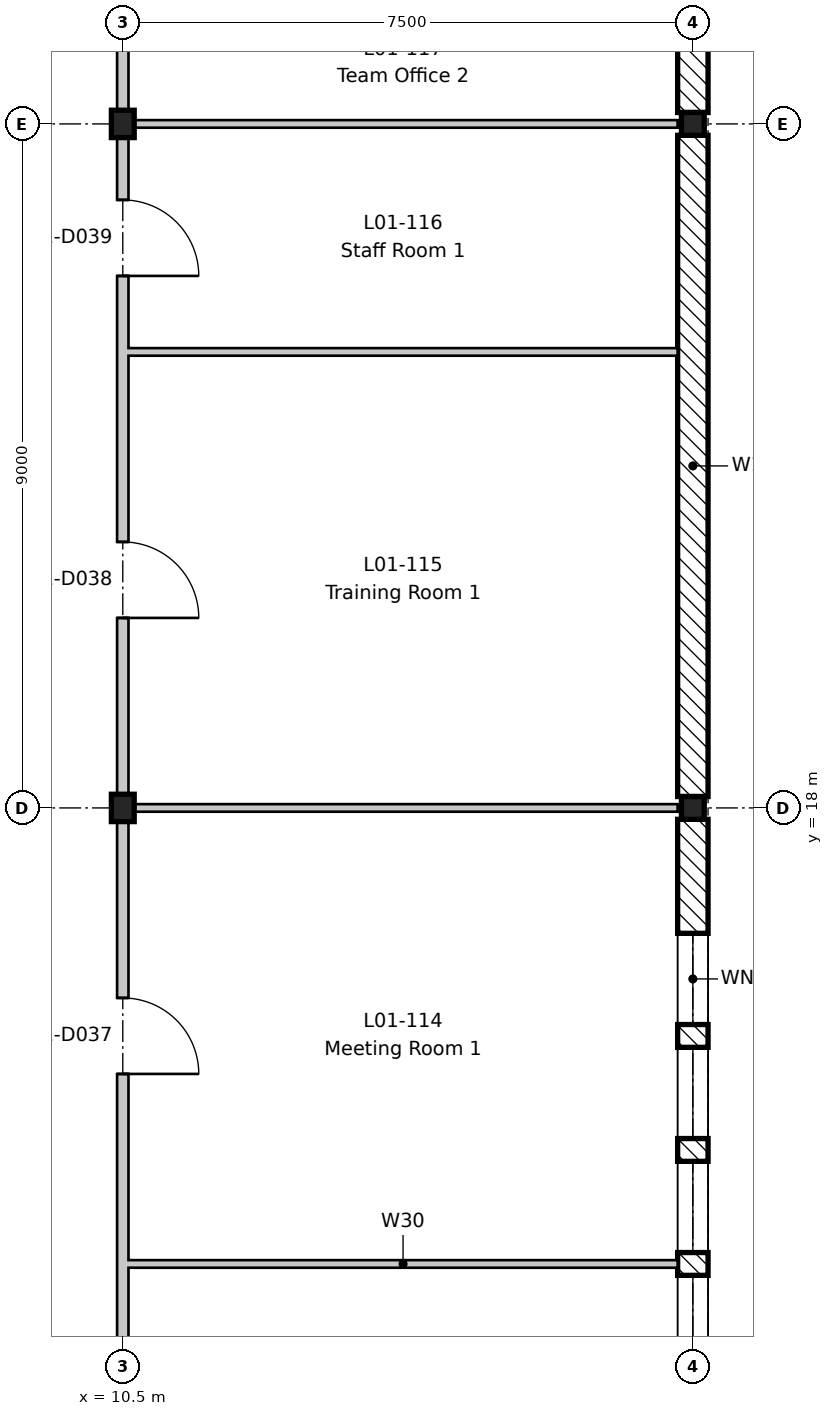
"""IFC4 building model, lengths in metres.
Left out: names, types, materials, properties, quantities, classifications, styles, units other than length and angle.
Written with IfcOpenShell. Run it as: python <this file> out.ifc"""

import sys

from ifc_helpers import new_model, si_unit, direction, frame, frame_2d, origin, origin_2d, place, context, subcontext, project, spatial, rectangle, i_section, extrude, element, fill, save


model = new_model("IFC4")
c1 = context("Model", 3, precision=1e-05, world=origin(), true_north=direction((0.0, 1.0)))
c2 = subcontext(c1, "Body", "Model", "MODEL_VIEW")
j1 = project(units=[si_unit("LENGTHUNIT", "METRE"), si_unit("PLANEANGLEUNIT", "RADIAN")], contexts=[c1])
p1 = place(None, origin())
s1 = spatial("IfcSite", under=j1, at=p1, CompositionType="ELEMENT")
p2 = place(p1, origin())
s2 = spatial("IfcBuilding", under=s1, at=p2, CompositionType="ELEMENT")
p3 = place(p2, frame((0.0, 0.0, 5.4)))
s3 = spatial("IfcBuildingStorey", under=s2, at=p3, CompositionType="ELEMENT", Elevation=5.4)
for number, where, z_axis, x_axis in (
    (1, (10.5, 18.0, -0.2), (0.0, 0.0, 1.0), (1.0, 0.0, 0.0)),
    (2, (10.5, 27.0, -0.2), (0.0, 0.0, 1.0), (1.0, 0.0, 0.0)),
):
    element("IfcColumn", number, at=place(p3, frame(where, z_axis=z_axis, x_axis=x_axis)), inside=s3, PredefinedType="COLUMN", context=c2, shape_type="SweptSolid", body=[
        extrude(i_section(OverallWidth=0.3, OverallDepth=0.36, WebThickness=0.012, FlangeThickness=0.022, FilletRadius=0.027, at=origin_2d()), origin(), (0.0, 0.0, 1.0), 4.5),
    ])
for number, where, z_axis, x_axis in (
    (3, (18.0, 18.0, -0.2), (0.0, 0.0, 1.0), (1.0, 0.0, 0.0)),
    (4, (18.0, 27.0, -0.2), (0.0, 0.0, 1.0), (1.0, 0.0, 0.0)),
):
    element("IfcColumn", number, at=place(p3, frame(where, z_axis=z_axis, x_axis=x_axis)), inside=s3, PredefinedType="COLUMN", context=c2, shape_type="SweptSolid", body=[
        extrude(i_section(OverallWidth=0.3, OverallDepth=0.3, WebThickness=0.011, FlangeThickness=0.019, FilletRadius=0.027, at=origin_2d()), origin(), (0.0, 0.0, 1.0), 4.5),
    ])
p4 = place(p3, frame((18.0, 17.85, 0.0), z_axis=(0.0, 0.0, 1.0), x_axis=(0.0, -1.0, 0.0)))
e5 = element("IfcWall", 5, at=p4, inside=s3, PredefinedType="STANDARD", context=c2, shape_type="SweptSolid", body=[
    extrude(rectangle(XDim=8.7, YDim=0.4, at=frame_2d((4.35, 0.0))), origin(), (0.0, 0.0, 1.0), 3.9),
])
p5 = place(p4, frame((6.0, 0.0, 0.6)))
e6 = element("IfcOpeningElement", 6, at=p5, cuts=e5, PredefinedType="OPENING", context=c2, shape_type="SweptSolid", body=[
    extrude(rectangle(XDim=1.2, YDim=3.0, at=frame_2d((0.6, 1.5))), frame((0.0, 0.21, 0.0), z_axis=(0.0, -1.0, 0.0), x_axis=(1.0, 0.0, 0.0)), (0.0, 0.0, 1.0), 0.42),
])
p6 = place(p4, frame((4.5, 0.0, 0.6)))
e7 = element("IfcOpeningElement", 7, at=p6, cuts=e5, PredefinedType="OPENING", context=c2, shape_type="SweptSolid", body=[
    extrude(rectangle(XDim=1.2, YDim=3.0, at=frame_2d((0.6, 1.5))), frame((0.0, 0.21, 0.0), z_axis=(0.0, -1.0, 0.0), x_axis=(1.0, 0.0, 0.0)), (0.0, 0.0, 1.0), 0.42),
])
p7 = place(p4, frame((3.0, 0.0, 0.6)))
e8 = element("IfcOpeningElement", 8, at=p7, cuts=e5, PredefinedType="OPENING", context=c2, shape_type="SweptSolid", body=[
    extrude(rectangle(XDim=1.2, YDim=3.0, at=frame_2d((0.6, 1.5))), frame((0.0, 0.21, 0.0), z_axis=(0.0, -1.0, 0.0), x_axis=(1.0, 0.0, 0.0)), (0.0, 0.0, 1.0), 0.42),
])
p8 = place(p4, frame((1.5, 0.0, 0.6)))
e9 = element("IfcOpeningElement", 9, at=p8, cuts=e5, PredefinedType="OPENING", context=c2, shape_type="SweptSolid", body=[
    extrude(rectangle(XDim=1.2, YDim=3.0, at=frame_2d((0.6, 1.5))), frame((0.0, 0.21, 0.0), z_axis=(0.0, -1.0, 0.0), x_axis=(1.0, 0.0, 0.0)), (0.0, 0.0, 1.0), 0.42),
])
p9 = place(p3, frame((18.0, 26.85, 0.0), z_axis=(0.0, 0.0, 1.0), x_axis=(0.0, -1.0, 0.0)))
e10 = element("IfcWall", 10, at=p9, inside=s3, PredefinedType="STANDARD", context=c2, shape_type="SweptSolid", body=[
    extrude(rectangle(XDim=8.7, YDim=0.4, at=frame_2d((4.35, 0.0))), origin(), (0.0, 0.0, 1.0), 3.9),
])
p10 = place(p3, frame((18.0, 35.85, 0.0), z_axis=(0.0, 0.0, 1.0), x_axis=(0.0, -1.0, 0.0)))
e11 = element("IfcWall", 11, at=p10, inside=s3, PredefinedType="STANDARD", context=c2, shape_type="SweptSolid", body=[
    extrude(rectangle(XDim=8.7, YDim=0.4, at=frame_2d((4.35, 0.0))), origin(), (0.0, 0.0, 1.0), 3.9),
])
p11 = place(p10, frame((6.0, 0.0, 0.6)))
e12 = element("IfcOpeningElement", 12, at=p11, cuts=e11, PredefinedType="OPENING", context=c2, shape_type="SweptSolid", body=[
    extrude(rectangle(XDim=1.2, YDim=3.0, at=frame_2d((0.6, 1.5))), frame((0.0, 0.21, 0.0), z_axis=(0.0, -1.0, 0.0), x_axis=(1.0, 0.0, 0.0)), (0.0, 0.0, 1.0), 0.42),
])
p12 = place(p10, frame((4.5, 0.0, 0.6)))
e13 = element("IfcOpeningElement", 13, at=p12, cuts=e11, PredefinedType="OPENING", context=c2, shape_type="SweptSolid", body=[
    extrude(rectangle(XDim=1.2, YDim=3.0, at=frame_2d((0.6, 1.5))), frame((0.0, 0.21, 0.0), z_axis=(0.0, -1.0, 0.0), x_axis=(1.0, 0.0, 0.0)), (0.0, 0.0, 1.0), 0.42),
])
p13 = place(p10, frame((3.0, 0.0, 0.6)))
e14 = element("IfcOpeningElement", 14, at=p13, cuts=e11, PredefinedType="OPENING", context=c2, shape_type="SweptSolid", body=[
    extrude(rectangle(XDim=1.2, YDim=3.0, at=frame_2d((0.6, 1.5))), frame((0.0, 0.21, 0.0), z_axis=(0.0, -1.0, 0.0), x_axis=(1.0, 0.0, 0.0)), (0.0, 0.0, 1.0), 0.42),
])
p14 = place(p10, frame((1.5, 0.0, 0.6)))
e15 = element("IfcOpeningElement", 15, at=p14, cuts=e11, PredefinedType="OPENING", context=c2, shape_type="SweptSolid", body=[
    extrude(rectangle(XDim=1.2, YDim=3.0, at=frame_2d((0.6, 1.5))), frame((0.0, 0.21, 0.0), z_axis=(0.0, -1.0, 0.0), x_axis=(1.0, 0.0, 0.0)), (0.0, 0.0, 1.0), 0.42),
])
p15 = place(p3, frame((10.575, 12.0, 0.0), z_axis=(0.0, 0.0, 1.0), x_axis=(1.0, 0.0, 0.0)))
e16 = element("IfcWall", 16, at=p15, inside=s3, PredefinedType="PARTITIONING", context=c2, shape_type="SweptSolid", body=[
    extrude(rectangle(XDim=7.225, YDim=0.1, at=frame_2d((3.613, 0.0))), origin(), (0.0, 0.0, 1.0), 4.3),
])
p16 = place(p3, frame((10.575, 18.0, 0.0), z_axis=(0.0, 0.0, 1.0), x_axis=(1.0, 0.0, 0.0)))
e17 = element("IfcWall", 17, at=p16, inside=s3, PredefinedType="PARTITIONING", context=c2, shape_type="SweptSolid", body=[
    extrude(rectangle(XDim=7.225, YDim=0.1, at=frame_2d((3.613, 0.0))), origin(), (0.0, 0.0, 1.0), 3.95),
])
p17 = place(p3, frame((10.575, 24.0, 0.0), z_axis=(0.0, 0.0, 1.0), x_axis=(1.0, 0.0, 0.0)))
e18 = element("IfcWall", 18, at=p17, inside=s3, PredefinedType="PARTITIONING", context=c2, shape_type="SweptSolid", body=[
    extrude(rectangle(XDim=7.225, YDim=0.1, at=frame_2d((3.613, 0.0))), origin(), (0.0, 0.0, 1.0), 4.3),
])
p18 = place(p3, frame((10.575, 27.0, 0.0), z_axis=(0.0, 0.0, 1.0), x_axis=(1.0, 0.0, 0.0)))
e19 = element("IfcWall", 19, at=p18, inside=s3, PredefinedType="PARTITIONING", context=c2, shape_type="SweptSolid", body=[
    extrude(rectangle(XDim=7.225, YDim=0.1, at=frame_2d((3.613, 0.0))), origin(), (0.0, 0.0, 1.0), 3.95),
])
p19 = place(p3, frame((10.5, -8.8, 0.0), z_axis=(0.0, 0.0, 1.0), x_axis=(0.0, 1.0, 0.0)))
e20 = element("IfcWall", 20, at=p19, inside=s3, PredefinedType="PARTITIONING", context=c2, shape_type="SweptSolid", body=[
    extrude(rectangle(XDim=79.3, YDim=0.15, at=frame_2d((39.65, 0.0))), origin(), (0.0, 0.0, 1.0), 3.78),
])
p20 = place(p19, frame((0.8, 0.0, 0.0)))
e21 = element("IfcOpeningElement", 21, at=p20, cuts=e20, PredefinedType="OPENING", context=c2, shape_type="SweptSolid", body=[
    extrude(rectangle(XDim=1.0, YDim=2.1, at=frame_2d((0.5, 1.05))), frame((0.0, 0.085, 0.0), z_axis=(0.0, -1.0, 0.0), x_axis=(1.0, 0.0, 0.0)), (0.0, 0.0, 1.0), 0.17),
])
p21 = place(p19, frame((5.3, 0.0, 0.0)))
e22 = element("IfcOpeningElement", 22, at=p21, cuts=e20, PredefinedType="OPENING", context=c2, shape_type="SweptSolid", body=[
    extrude(rectangle(XDim=1.0, YDim=2.1, at=frame_2d((0.5, 1.05))), frame((0.0, 0.085, 0.0), z_axis=(0.0, -1.0, 0.0), x_axis=(1.0, 0.0, 0.0)), (0.0, 0.0, 1.0), 0.17),
])
p22 = place(p19, frame((11.3, 0.0, 0.0)))
e23 = element("IfcOpeningElement", 23, at=p22, cuts=e20, PredefinedType="OPENING", context=c2, shape_type="SweptSolid", body=[
    extrude(rectangle(XDim=1.0, YDim=2.1, at=frame_2d((0.5, 1.05))), frame((0.0, 0.085, 0.0), z_axis=(0.0, -1.0, 0.0), x_axis=(1.0, 0.0, 0.0)), (0.0, 0.0, 1.0), 0.17),
])
p23 = place(p19, frame((15.8, 0.0, 0.0)))
e24 = element("IfcOpeningElement", 24, at=p23, cuts=e20, PredefinedType="OPENING", context=c2, shape_type="SweptSolid", body=[
    extrude(rectangle(XDim=1.0, YDim=2.1, at=frame_2d((0.5, 1.05))), frame((0.0, 0.085, 0.0), z_axis=(0.0, -1.0, 0.0), x_axis=(1.0, 0.0, 0.0)), (0.0, 0.0, 1.0), 0.17),
])
p24 = place(p19, frame((18.8, 0.0, 0.0)))
e25 = element("IfcOpeningElement", 25, at=p24, cuts=e20, PredefinedType="OPENING", context=c2, shape_type="SweptSolid", body=[
    extrude(rectangle(XDim=1.0, YDim=2.1, at=frame_2d((0.5, 1.05))), frame((0.0, 0.085, 0.0), z_axis=(0.0, -1.0, 0.0), x_axis=(1.0, 0.0, 0.0)), (0.0, 0.0, 1.0), 0.17),
])
p25 = place(p19, frame((23.3, 0.0, 0.0)))
e26 = element("IfcOpeningElement", 26, at=p25, cuts=e20, PredefinedType="OPENING", context=c2, shape_type="SweptSolid", body=[
    extrude(rectangle(XDim=1.0, YDim=2.1, at=frame_2d((0.5, 1.05))), frame((0.0, 0.085, 0.0), z_axis=(0.0, -1.0, 0.0), x_axis=(1.0, 0.0, 0.0)), (0.0, 0.0, 1.0), 0.17),
])
p26 = place(p19, frame((29.3, 0.0, 0.0)))
e27 = element("IfcOpeningElement", 27, at=p26, cuts=e20, PredefinedType="OPENING", context=c2, shape_type="SweptSolid", body=[
    extrude(rectangle(XDim=1.0, YDim=2.1, at=frame_2d((0.5, 1.05))), frame((0.0, 0.085, 0.0), z_axis=(0.0, -1.0, 0.0), x_axis=(1.0, 0.0, 0.0)), (0.0, 0.0, 1.0), 0.17),
])
p27 = place(p19, frame((33.8, 0.0, 0.0)))
e28 = element("IfcOpeningElement", 28, at=p27, cuts=e20, PredefinedType="OPENING", context=c2, shape_type="SweptSolid", body=[
    extrude(rectangle(XDim=1.0, YDim=2.1, at=frame_2d((0.5, 1.05))), frame((0.0, 0.085, 0.0), z_axis=(0.0, -1.0, 0.0), x_axis=(1.0, 0.0, 0.0)), (0.0, 0.0, 1.0), 0.17),
])
p28 = place(p19, frame((38.3, 0.0, 0.0)))
e29 = element("IfcOpeningElement", 29, at=p28, cuts=e20, PredefinedType="OPENING", context=c2, shape_type="SweptSolid", body=[
    extrude(rectangle(XDim=1.0, YDim=2.1, at=frame_2d((0.5, 1.05))), frame((0.0, 0.085, 0.0), z_axis=(0.0, -1.0, 0.0), x_axis=(1.0, 0.0, 0.0)), (0.0, 0.0, 1.0), 0.17),
])
p29 = place(p19, frame((42.8, 0.0, 0.0)))
e30 = element("IfcOpeningElement", 30, at=p29, cuts=e20, PredefinedType="OPENING", context=c2, shape_type="SweptSolid", body=[
    extrude(rectangle(XDim=1.0, YDim=2.1, at=frame_2d((0.5, 1.05))), frame((0.0, 0.085, 0.0), z_axis=(0.0, -1.0, 0.0), x_axis=(1.0, 0.0, 0.0)), (0.0, 0.0, 1.0), 0.17),
])
p30 = place(p19, frame((45.8, 0.0, 0.0)))
e31 = element("IfcOpeningElement", 31, at=p30, cuts=e20, PredefinedType="OPENING", context=c2, shape_type="SweptSolid", body=[
    extrude(rectangle(XDim=1.0, YDim=2.1, at=frame_2d((0.5, 1.05))), frame((0.0, 0.085, 0.0), z_axis=(0.0, -1.0, 0.0), x_axis=(1.0, 0.0, 0.0)), (0.0, 0.0, 1.0), 0.17),
])
p31 = place(p19, frame((50.3, 0.0, 0.0)))
e32 = element("IfcOpeningElement", 32, at=p31, cuts=e20, PredefinedType="OPENING", context=c2, shape_type="SweptSolid", body=[
    extrude(rectangle(XDim=1.0, YDim=2.1, at=frame_2d((0.5, 1.05))), frame((0.0, 0.085, 0.0), z_axis=(0.0, -1.0, 0.0), x_axis=(1.0, 0.0, 0.0)), (0.0, 0.0, 1.0), 0.17),
])
p32 = place(p19, frame((54.8, 0.0, 0.0)))
e33 = element("IfcOpeningElement", 33, at=p32, cuts=e20, PredefinedType="OPENING", context=c2, shape_type="SweptSolid", body=[
    extrude(rectangle(XDim=1.0, YDim=2.1, at=frame_2d((0.5, 1.05))), frame((0.0, 0.085, 0.0), z_axis=(0.0, -1.0, 0.0), x_axis=(1.0, 0.0, 0.0)), (0.0, 0.0, 1.0), 0.17),
])
p33 = place(p19, frame((57.8, 0.0, 0.0)))
e34 = element("IfcOpeningElement", 34, at=p33, cuts=e20, PredefinedType="OPENING", context=c2, shape_type="SweptSolid", body=[
    extrude(rectangle(XDim=1.0, YDim=2.1, at=frame_2d((0.5, 1.05))), frame((0.0, 0.085, 0.0), z_axis=(0.0, -1.0, 0.0), x_axis=(1.0, 0.0, 0.0)), (0.0, 0.0, 1.0), 0.17),
])
p34 = place(p19, frame((63.6, 0.0, 0.0)))
e35 = element("IfcOpeningElement", 35, at=p34, cuts=e20, PredefinedType="OPENING", context=c2, shape_type="SweptSolid", body=[
    extrude(rectangle(XDim=1.4, YDim=2.1, at=frame_2d((0.7, 1.05))), frame((0.0, 0.085, 0.0), z_axis=(0.0, -1.0, 0.0), x_axis=(1.0, 0.0, 0.0)), (0.0, 0.0, 1.0), 0.17),
])
p35 = place(p19, frame((69.8, 0.0, 0.0)))
e36 = element("IfcOpeningElement", 36, at=p35, cuts=e20, PredefinedType="OPENING", context=c2, shape_type="SweptSolid", body=[
    extrude(rectangle(XDim=1.0, YDim=2.1, at=frame_2d((0.5, 1.05))), frame((0.0, 0.085, 0.0), z_axis=(0.0, -1.0, 0.0), x_axis=(1.0, 0.0, 0.0)), (0.0, 0.0, 1.0), 0.17),
])
p36 = place(p19, frame((72.8, 0.0, 0.0)))
e37 = element("IfcOpeningElement", 37, at=p36, cuts=e20, PredefinedType="OPENING", context=c2, shape_type="SweptSolid", body=[
    extrude(rectangle(XDim=1.0, YDim=2.1, at=frame_2d((0.5, 1.05))), frame((0.0, 0.085, 0.0), z_axis=(0.0, -1.0, 0.0), x_axis=(1.0, 0.0, 0.0)), (0.0, 0.0, 1.0), 0.17),
])
p37 = place(p5, origin())
e38 = element("IfcWindow", 38, at=p37, inside=s3, PartitioningType="SINGLE_PANEL", PredefinedType="WINDOW", context=c2, shape_type="SweptSolid", body=[
    extrude(rectangle(XDim=1.2, YDim=3.0, at=frame_2d((0.6, 1.5))), frame((0.0, 0.03, 0.0), z_axis=(0.0, -1.0, 0.0), x_axis=(1.0, 0.0, 0.0)), (0.0, 0.0, 1.0), 0.06),
])
fill(e6, e38)
p38 = place(p6, origin())
e39 = element("IfcWindow", 39, at=p38, inside=s3, PartitioningType="SINGLE_PANEL", PredefinedType="WINDOW", context=c2, shape_type="SweptSolid", body=[
    extrude(rectangle(XDim=1.2, YDim=3.0, at=frame_2d((0.6, 1.5))), frame((0.0, 0.03, 0.0), z_axis=(0.0, -1.0, 0.0), x_axis=(1.0, 0.0, 0.0)), (0.0, 0.0, 1.0), 0.06),
])
fill(e7, e39)
p39 = place(p7, origin())
e40 = element("IfcWindow", 40, at=p39, inside=s3, PartitioningType="SINGLE_PANEL", PredefinedType="WINDOW", context=c2, shape_type="SweptSolid", body=[
    extrude(rectangle(XDim=1.2, YDim=3.0, at=frame_2d((0.6, 1.5))), frame((0.0, 0.03, 0.0), z_axis=(0.0, -1.0, 0.0), x_axis=(1.0, 0.0, 0.0)), (0.0, 0.0, 1.0), 0.06),
])
fill(e8, e40)
p40 = place(p8, origin())
e41 = element("IfcWindow", 41, at=p40, inside=s3, PartitioningType="SINGLE_PANEL", PredefinedType="WINDOW", context=c2, shape_type="SweptSolid", body=[
    extrude(rectangle(XDim=1.2, YDim=3.0, at=frame_2d((0.6, 1.5))), frame((0.0, 0.03, 0.0), z_axis=(0.0, -1.0, 0.0), x_axis=(1.0, 0.0, 0.0)), (0.0, 0.0, 1.0), 0.06),
])
fill(e9, e41)
p41 = place(p25, frame((1.0, 0.0, 0.0), z_axis=(0.0, 0.0, 1.0), x_axis=(-1.0, 0.0, 0.0)))
e42 = element("IfcDoor", 42, at=p41, inside=s3, OperationType="SINGLE_SWING_RIGHT", PredefinedType="DOOR", context=c2, shape_type="SweptSolid", body=[
    extrude(rectangle(XDim=1.0, YDim=2.1, at=frame_2d((0.5, 1.05))), frame((0.0, 0.025, 0.0), z_axis=(0.0, -1.0, 0.0), x_axis=(1.0, 0.0, 0.0)), (0.0, 0.0, 1.0), 0.05),
])
fill(e26, e42)
p42 = place(p26, frame((1.0, 0.0, 0.0), z_axis=(0.0, 0.0, 1.0), x_axis=(-1.0, 0.0, 0.0)))
e43 = element("IfcDoor", 43, at=p42, inside=s3, OperationType="SINGLE_SWING_RIGHT", PredefinedType="DOOR", context=c2, shape_type="SweptSolid", body=[
    extrude(rectangle(XDim=1.0, YDim=2.1, at=frame_2d((0.5, 1.05))), frame((0.0, 0.025, 0.0), z_axis=(0.0, -1.0, 0.0), x_axis=(1.0, 0.0, 0.0)), (0.0, 0.0, 1.0), 0.05),
])
fill(e27, e43)
p43 = place(p27, frame((1.0, 0.0, 0.0), z_axis=(0.0, 0.0, 1.0), x_axis=(-1.0, 0.0, 0.0)))
e44 = element("IfcDoor", 44, at=p43, inside=s3, OperationType="SINGLE_SWING_RIGHT", PredefinedType="DOOR", context=c2, shape_type="SweptSolid", body=[
    extrude(rectangle(XDim=1.0, YDim=2.1, at=frame_2d((0.5, 1.05))), frame((0.0, 0.025, 0.0), z_axis=(0.0, -1.0, 0.0), x_axis=(1.0, 0.0, 0.0)), (0.0, 0.0, 1.0), 0.05),
])
fill(e28, e44)
save(model, sys.argv[1])
